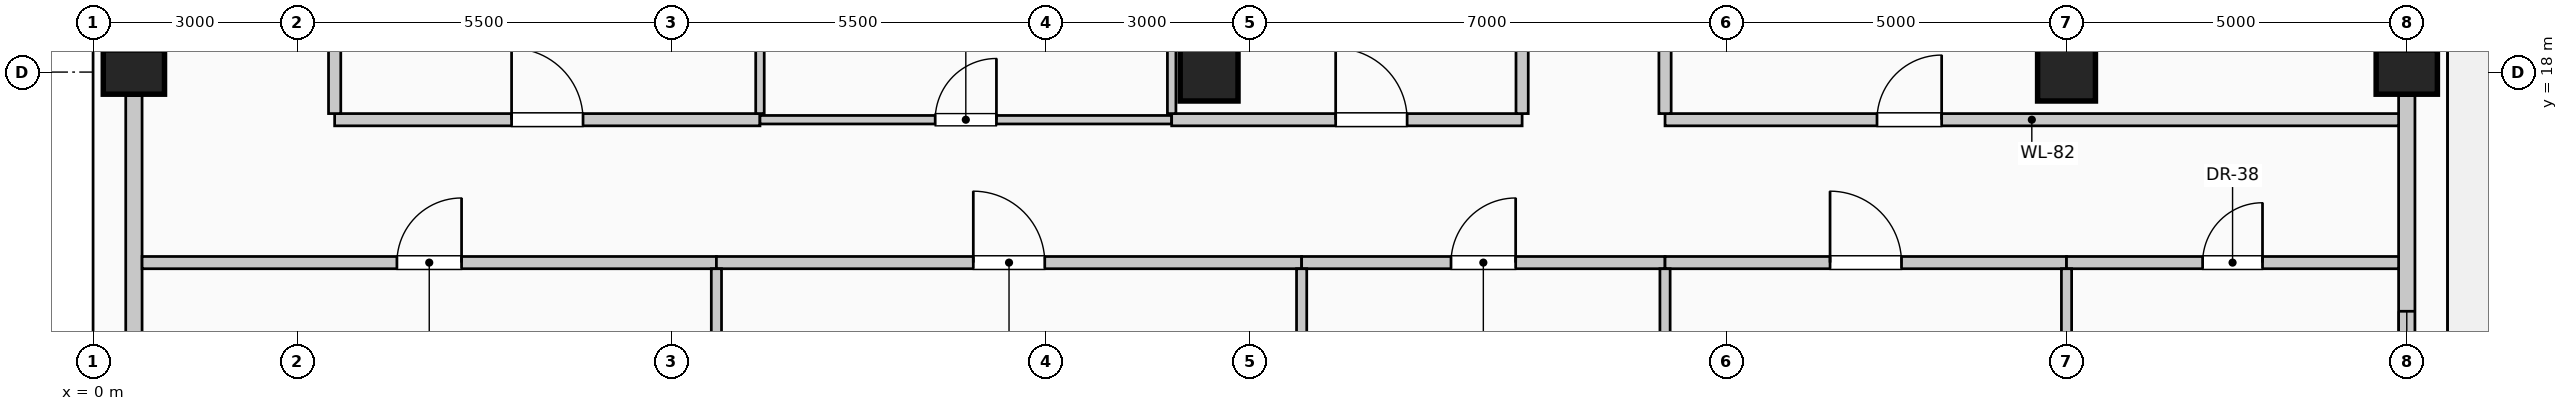
"""IFC4 building model, lengths in metres.
Left out: names, types, materials, properties, quantities, classifications, styles, units other than length and angle.
Written with IfcOpenShell. Run it as: python <this file> out.ifc"""

import sys

from ifc_helpers import new_model, si_unit, direction, frame, frame_2d, origin, origin_2d, place, context, subcontext, project, spatial, rectangle, circle, extrude, element, fill, save


model = new_model("IFC4")
c1 = context("Model", 3, precision=1e-05, world=origin(), true_north=direction((0.0, 1.0)))
c2 = subcontext(c1, "Body", "Model", "MODEL_VIEW")
j1 = project(units=[si_unit("LENGTHUNIT", "METRE"), si_unit("PLANEANGLEUNIT", "RADIAN")], contexts=[c1])
p1 = place(None, origin())
s1 = spatial("IfcSite", under=j1, at=p1, CompositionType="ELEMENT")
p2 = place(p1, origin())
s2 = spatial("IfcBuilding", under=s1, at=p2, CompositionType="ELEMENT")
p3 = place(p2, frame((0.0, 0.0, 305.0)))
s3 = spatial("IfcBuildingStorey", under=s2, at=p3, CompositionType="ELEMENT", Elevation=305.0)
for number, where, z_axis, x_axis in (
    (1, (0.6, 18.0, 0.0), (0.0, 0.0, 1.0), (0.0, 1.0, 0.0)),
    (2, (34.0, 18.0, 0.0), (0.0, 0.0, 1.0), (0.0, 1.0, 0.0)),
):
    element("IfcColumn", number, at=place(p3, frame(where, z_axis=z_axis, x_axis=x_axis)), inside=s3, PredefinedType="COLUMN", context=c2, shape_type="SweptSolid", body=[
        extrude(rectangle(XDim=0.65, YDim=0.9, at=origin_2d()), origin(), (0.0, 0.0, 1.0), 4.0),
    ])
for number, where, z_axis, x_axis in (
    (3, (16.4, 18.0, 0.0), (0.0, 0.0, 1.0), (1.0, 0.0, 0.0)),
    (4, (29.0, 18.0, 0.0), (0.0, 0.0, 1.0), (1.0, 0.0, 0.0)),
):
    element("IfcColumn", number, at=place(p3, frame(where, z_axis=z_axis, x_axis=x_axis)), inside=s3, PredefinedType="COLUMN", context=c2, shape_type="SweptSolid", body=[
        extrude(circle(Radius=0.425, at=origin_2d()), origin(), (0.0, 0.0, 1.0), 4.0),
    ])
p4 = place(p3, frame((0.6, 10.345, 0.0), z_axis=(0.0, 0.0, 1.0), x_axis=(0.0, 1.0, 0.0)))
e5 = element("IfcWall", 5, at=p4, inside=s3, PredefinedType="SOLIDWALL", context=c2, shape_type="SweptSolid", body=[
    extrude(rectangle(XDim=7.31, YDim=0.24, at=frame_2d((3.655, 0.0))), origin(), (0.0, 0.0, 1.0), 3.025),
])
p5 = place(p4, frame((1.037, 0.0, 0.35)))
e6 = element("IfcOpeningElement", 6, at=p5, cuts=e5, PredefinedType="OPENING", context=c2, shape_type="SweptSolid", body=[
    extrude(rectangle(XDim=2.1, YDim=2.2, at=frame_2d((1.05, 1.1))), frame((0.0, 0.13, 0.0), z_axis=(0.0, -1.0, 0.0), x_axis=(1.0, 0.0, 0.0)), (0.0, 0.0, 1.0), 0.26),
])
p6 = place(p3, frame((34.0, 17.655, 0.0), z_axis=(0.0, 0.0, 1.0), x_axis=(0.0, -1.0, 0.0)))
e7 = element("IfcWall", 7, at=p6, inside=s3, PredefinedType="SOLIDWALL", context=c2, shape_type="SweptSolid", body=[
    extrude(rectangle(XDim=13.71, YDim=0.24, at=frame_2d((6.855, 0.0))), origin(), (0.0, 0.0, 1.0), 3.025),
])
p7 = place(p6, frame((3.17, 0.0, 0.35)))
e8 = element("IfcOpeningElement", 8, at=p7, cuts=e7, PredefinedType="OPENING", context=c2, shape_type="SweptSolid", body=[
    extrude(rectangle(XDim=2.1, YDim=2.2, at=frame_2d((1.05, 1.1))), frame((0.0, 0.13, 0.0), z_axis=(0.0, -1.0, 0.0), x_axis=(1.0, 0.0, 0.0)), (0.0, 0.0, 1.0), 0.26),
])
p8 = place(p6, frame((8.44, 0.0, 0.35)))
e9 = element("IfcOpeningElement", 9, at=p8, cuts=e7, PredefinedType="OPENING", context=c2, shape_type="SweptSolid", body=[
    extrude(rectangle(XDim=2.1, YDim=2.2, at=frame_2d((1.05, 1.1))), frame((0.0, 0.13, 0.0), z_axis=(0.0, -1.0, 0.0), x_axis=(1.0, 0.0, 0.0)), (0.0, 0.0, 1.0), 0.26),
])
p9 = place(p3, frame((0.72, 15.2, 0.0), z_axis=(0.0, 0.0, 1.0), x_axis=(1.0, 0.0, 0.0)))
e10 = element("IfcWall", 10, at=p9, inside=s3, PredefinedType="PARTITIONING", context=c2, shape_type="SweptSolid", body=[
    extrude(rectangle(XDim=8.44, YDim=0.18, at=frame_2d((4.22, 0.0))), origin(), (0.0, 0.0, 1.0), 3.775),
])
p10 = place(p9, frame((3.745, 0.0, 0.0)))
e11 = element("IfcOpeningElement", 11, at=p10, cuts=e10, PredefinedType="OPENING", context=c2, shape_type="SweptSolid", body=[
    extrude(rectangle(XDim=0.95, YDim=2.15, at=frame_2d((0.475, 1.075))), frame((0.0, 0.1, 0.0), z_axis=(0.0, -1.0, 0.0), x_axis=(1.0, 0.0, 0.0)), (0.0, 0.0, 1.0), 0.2),
])
p11 = place(p3, frame((9.16, 15.2, 0.0), z_axis=(0.0, 0.0, 1.0), x_axis=(1.0, 0.0, 0.0)))
e12 = element("IfcWall", 12, at=p11, inside=s3, PredefinedType="PARTITIONING", context=c2, shape_type="SweptSolid", body=[
    extrude(rectangle(XDim=8.6, YDim=0.18, at=frame_2d((4.3, 0.0))), origin(), (0.0, 0.0, 1.0), 3.775),
])
p12 = place(p11, frame((3.775, 0.0, 0.0)))
e13 = element("IfcOpeningElement", 13, at=p12, cuts=e12, PredefinedType="OPENING", context=c2, shape_type="SweptSolid", body=[
    extrude(rectangle(XDim=1.05, YDim=2.15, at=frame_2d((0.525, 1.075))), frame((0.0, 0.1, 0.0), z_axis=(0.0, -1.0, 0.0), x_axis=(1.0, 0.0, 0.0)), (0.0, 0.0, 1.0), 0.2),
])
p13 = place(p3, frame((17.76, 15.2, 0.0), z_axis=(0.0, 0.0, 1.0), x_axis=(1.0, 0.0, 0.0)))
e14 = element("IfcWall", 14, at=p13, inside=s3, PredefinedType="PARTITIONING", context=c2, shape_type="SweptSolid", body=[
    extrude(rectangle(XDim=5.34, YDim=0.18, at=frame_2d((2.67, 0.0))), origin(), (0.0, 0.0, 1.0), 3.775),
])
p14 = place(p13, frame((2.195, 0.0, 0.0)))
e15 = element("IfcOpeningElement", 15, at=p14, cuts=e14, PredefinedType="OPENING", context=c2, shape_type="SweptSolid", body=[
    extrude(rectangle(XDim=0.95, YDim=2.15, at=frame_2d((0.475, 1.075))), frame((0.0, 0.1, 0.0), z_axis=(0.0, -1.0, 0.0), x_axis=(1.0, 0.0, 0.0)), (0.0, 0.0, 1.0), 0.2),
])
p15 = place(p3, frame((23.1, 15.2, 0.0), z_axis=(0.0, 0.0, 1.0), x_axis=(1.0, 0.0, 0.0)))
e16 = element("IfcWall", 16, at=p15, inside=s3, PredefinedType="PARTITIONING", context=c2, shape_type="SweptSolid", body=[
    extrude(rectangle(XDim=5.9, YDim=0.18, at=frame_2d((2.95, 0.0))), origin(), (0.0, 0.0, 1.0), 3.775),
])
p16 = place(p15, frame((2.425, 0.0, 0.0)))
e17 = element("IfcOpeningElement", 17, at=p16, cuts=e16, PredefinedType="OPENING", context=c2, shape_type="SweptSolid", body=[
    extrude(rectangle(XDim=1.05, YDim=2.15, at=frame_2d((0.525, 1.075))), frame((0.0, 0.1, 0.0), z_axis=(0.0, -1.0, 0.0), x_axis=(1.0, 0.0, 0.0)), (0.0, 0.0, 1.0), 0.2),
])
p17 = place(p3, frame((29.0, 15.2, 0.0), z_axis=(0.0, 0.0, 1.0), x_axis=(1.0, 0.0, 0.0)))
e18 = element("IfcWall", 18, at=p17, inside=s3, PredefinedType="PARTITIONING", context=c2, shape_type="SweptSolid", body=[
    extrude(rectangle(XDim=4.88, YDim=0.18, at=frame_2d((2.44, 0.0))), origin(), (0.0, 0.0, 1.0), 3.775),
])
p18 = place(p17, frame((2.0, 0.0, 0.0)))
e19 = element("IfcOpeningElement", 19, at=p18, cuts=e18, PredefinedType="OPENING", context=c2, shape_type="SweptSolid", body=[
    extrude(rectangle(XDim=0.88, YDim=2.1, at=frame_2d((0.44, 1.05))), frame((0.0, 0.1, 0.0), z_axis=(0.0, -1.0, 0.0), x_axis=(1.0, 0.0, 0.0)), (0.0, 0.0, 1.0), 0.2),
])
p19 = place(p3, frame((3.55, 17.3, 0.0), z_axis=(0.0, 0.0, 1.0), x_axis=(1.0, 0.0, 0.0)))
e20 = element("IfcWall", 20, at=p19, inside=s3, PredefinedType="PARTITIONING", context=c2, shape_type="SweptSolid", body=[
    extrude(rectangle(XDim=6.25, YDim=0.18, at=frame_2d((3.125, 0.0))), origin(), (0.0, 0.0, 1.0), 3.775),
])
p20 = place(p19, frame((2.6, 0.0, 0.0)))
e21 = element("IfcOpeningElement", 21, at=p20, cuts=e20, PredefinedType="OPENING", context=c2, shape_type="SweptSolid", body=[
    extrude(rectangle(XDim=1.05, YDim=2.15, at=frame_2d((0.525, 1.075))), frame((0.0, 0.1, 0.0), z_axis=(0.0, -1.0, 0.0), x_axis=(1.0, 0.0, 0.0)), (0.0, 0.0, 1.0), 0.2),
])
p21 = place(p3, frame((9.8, 17.3, 0.0), z_axis=(0.0, 0.0, 1.0), x_axis=(1.0, 0.0, 0.0)))
e22 = element("IfcWall", 22, at=p21, inside=s3, PredefinedType="PARTITIONING", context=c2, shape_type="SweptSolid", body=[
    extrude(rectangle(XDim=6.05, YDim=0.125, at=frame_2d((3.025, 0.0))), origin(), (0.0, 0.0, 1.0), 3.775),
])
p22 = place(p21, frame((2.575, 0.0, 0.0)))
e23 = element("IfcOpeningElement", 23, at=p22, cuts=e22, PredefinedType="OPENING", context=c2, shape_type="SweptSolid", body=[
    extrude(rectangle(XDim=0.9, YDim=2.1, at=frame_2d((0.45, 1.05))), frame((0.0, 0.073, 0.0), z_axis=(0.0, -1.0, 0.0), x_axis=(1.0, 0.0, 0.0)), (0.0, 0.0, 1.0), 0.145),
])
p23 = place(p3, frame((15.85, 17.3, 0.0), z_axis=(0.0, 0.0, 1.0), x_axis=(1.0, 0.0, 0.0)))
e24 = element("IfcWall", 24, at=p23, inside=s3, PredefinedType="PARTITIONING", context=c2, shape_type="SweptSolid", body=[
    extrude(rectangle(XDim=5.15, YDim=0.18, at=frame_2d((2.575, 0.0))), origin(), (0.0, 0.0, 1.0), 3.775),
])
p24 = place(p23, frame((2.41, 0.0, 0.0)))
e25 = element("IfcOpeningElement", 25, at=p24, cuts=e24, PredefinedType="OPENING", context=c2, shape_type="SweptSolid", body=[
    extrude(rectangle(XDim=1.05, YDim=2.15, at=frame_2d((0.525, 1.075))), frame((0.0, 0.1, 0.0), z_axis=(0.0, -1.0, 0.0), x_axis=(1.0, 0.0, 0.0)), (0.0, 0.0, 1.0), 0.2),
])
p25 = place(p3, frame((23.1, 17.3, 0.0), z_axis=(0.0, 0.0, 1.0), x_axis=(1.0, 0.0, 0.0)))
e26 = element("IfcWall", 26, at=p25, inside=s3, PredefinedType="PARTITIONING", context=c2, shape_type="SweptSolid", body=[
    extrude(rectangle(XDim=10.78, YDim=0.18, at=frame_2d((5.39, 0.0))), origin(), (0.0, 0.0, 1.0), 3.775),
])
p26 = place(p25, frame((3.115, 0.0, 0.0)))
e27 = element("IfcOpeningElement", 27, at=p26, cuts=e26, PredefinedType="OPENING", context=c2, shape_type="SweptSolid", body=[
    extrude(rectangle(XDim=0.95, YDim=2.15, at=frame_2d((0.475, 1.075))), frame((0.0, 0.1, 0.0), z_axis=(0.0, -1.0, 0.0), x_axis=(1.0, 0.0, 0.0)), (0.0, 0.0, 1.0), 0.2),
])
p27 = place(p3, frame((3.55, 17.39, 0.0), z_axis=(0.0, 0.0, 1.0), x_axis=(0.0, 1.0, 0.0)))
e28 = element("IfcWall", 28, at=p27, inside=s3, PredefinedType="PARTITIONING", context=c2, shape_type="SweptSolid", body=[
    extrude(rectangle(XDim=7.335, YDim=0.18, at=frame_2d((3.667, 0.0))), origin(), (0.0, 0.0, 1.0), 3.775),
])
p28 = place(p3, frame((9.16, 0.72, 0.0), z_axis=(0.0, 0.0, 1.0), x_axis=(0.0, 1.0, 0.0)))
e29 = element("IfcWall", 29, at=p28, inside=s3, PredefinedType="PARTITIONING", context=c2, shape_type="SweptSolid", body=[
    extrude(rectangle(XDim=14.39, YDim=0.15, at=frame_2d((7.195, 0.0))), origin(), (0.0, 0.0, 1.0), 3.775),
])
for number, where, z_axis, x_axis in (
    (30, (9.8, 17.39, 0.0), (0.0, 0.0, 1.0), (0.0, 1.0, 0.0)),
    (31, (15.85, 17.39, 0.0), (0.0, 0.0, 1.0), (0.0, 1.0, 0.0)),
):
    element("IfcWall", number, at=place(p3, frame(where, z_axis=z_axis, x_axis=x_axis)), inside=s3, PredefinedType="PARTITIONING", context=c2, shape_type="SweptSolid", body=[
        extrude(rectangle(XDim=7.335, YDim=0.125, at=frame_2d((3.667, 0.0))), origin(), (0.0, 0.0, 1.0), 3.775),
    ])
p29 = place(p3, frame((17.76, 0.4, 0.0), z_axis=(0.0, 0.0, 1.0), x_axis=(0.0, 1.0, 0.0)))
e32 = element("IfcWall", 32, at=p29, inside=s3, PredefinedType="PARTITIONING", context=c2, shape_type="SweptSolid", body=[
    extrude(rectangle(XDim=14.71, YDim=0.15, at=frame_2d((7.355, 0.0))), origin(), (0.0, 0.0, 1.0), 3.775),
])
p30 = place(p3, frame((21.0, 17.39, 0.0), z_axis=(0.0, 0.0, 1.0), x_axis=(0.0, 1.0, 0.0)))
e33 = element("IfcWall", 33, at=p30, inside=s3, PredefinedType="PARTITIONING", context=c2, shape_type="SweptSolid", body=[
    extrude(rectangle(XDim=7.335, YDim=0.18, at=frame_2d((3.667, 0.0))), origin(), (0.0, 0.0, 1.0), 3.775),
])
p31 = place(p3, frame((23.1, 0.4, 0.0), z_axis=(0.0, 0.0, 1.0), x_axis=(0.0, 1.0, 0.0)))
e34 = element("IfcWall", 34, at=p31, inside=s3, PredefinedType="PARTITIONING", context=c2, shape_type="SweptSolid", body=[
    extrude(rectangle(XDim=14.71, YDim=0.15, at=frame_2d((7.355, 0.0))), origin(), (0.0, 0.0, 1.0), 3.775),
])
p32 = place(p3, frame((23.1, 17.39, 0.0), z_axis=(0.0, 0.0, 1.0), x_axis=(0.0, 1.0, 0.0)))
e35 = element("IfcWall", 35, at=p32, inside=s3, PredefinedType="PARTITIONING", context=c2, shape_type="SweptSolid", body=[
    extrude(rectangle(XDim=8.835, YDim=0.18, at=frame_2d((4.417, 0.0))), origin(), (0.0, 0.0, 1.0), 3.775),
])
p33 = place(p3, frame((29.0, 1.05, 0.0), z_axis=(0.0, 0.0, 1.0), x_axis=(0.0, 1.0, 0.0)))
e36 = element("IfcWall", 36, at=p33, inside=s3, PredefinedType="PARTITIONING", context=c2, shape_type="SweptSolid", body=[
    extrude(rectangle(XDim=14.06, YDim=0.15, at=frame_2d((7.03, 0.0))), origin(), (0.0, 0.0, 1.0), 3.27),
])
p34 = place(p7, origin())
e37 = element("IfcWindow", 37, at=p34, inside=s3, PartitioningType="SINGLE_PANEL", PredefinedType="WINDOW", context=c2, shape_type="SweptSolid", body=[
    extrude(rectangle(XDim=2.1, YDim=2.2, at=frame_2d((1.05, 1.1))), frame((0.0, 0.03, 0.0), z_axis=(0.0, -1.0, 0.0), x_axis=(1.0, 0.0, 0.0)), (0.0, 0.0, 1.0), 0.06),
])
fill(e8, e37)
p35 = place(p10, origin())
e38 = element("IfcDoor", 38, at=p35, inside=s3, OperationType="SINGLE_SWING_RIGHT", PredefinedType="DOOR", context=c2, shape_type="SweptSolid", body=[
    extrude(rectangle(XDim=0.95, YDim=2.15, at=frame_2d((0.475, 1.075))), frame((0.0, 0.025, 0.0), z_axis=(0.0, -1.0, 0.0), x_axis=(1.0, 0.0, 0.0)), (0.0, 0.0, 1.0), 0.05),
])
fill(e11, e38)
p36 = place(p12, origin())
e39 = element("IfcDoor", 39, at=p36, inside=s3, OperationType="SINGLE_SWING_LEFT", PredefinedType="DOOR", context=c2, shape_type="SweptSolid", body=[
    extrude(rectangle(XDim=1.05, YDim=2.15, at=frame_2d((0.525, 1.075))), frame((0.0, 0.025, 0.0), z_axis=(0.0, -1.0, 0.0), x_axis=(1.0, 0.0, 0.0)), (0.0, 0.0, 1.0), 0.05),
])
fill(e13, e39)
p37 = place(p14, origin())
e40 = element("IfcDoor", 40, at=p37, inside=s3, OperationType="SINGLE_SWING_RIGHT", PredefinedType="DOOR", context=c2, shape_type="SweptSolid", body=[
    extrude(rectangle(XDim=0.95, YDim=2.15, at=frame_2d((0.475, 1.075))), frame((0.0, 0.025, 0.0), z_axis=(0.0, -1.0, 0.0), x_axis=(1.0, 0.0, 0.0)), (0.0, 0.0, 1.0), 0.05),
])
fill(e15, e40)
p38 = place(p16, origin())
e41 = element("IfcDoor", 41, at=p38, inside=s3, OperationType="SINGLE_SWING_LEFT", PredefinedType="DOOR", context=c2, shape_type="SweptSolid", body=[
    extrude(rectangle(XDim=1.05, YDim=2.15, at=frame_2d((0.525, 1.075))), frame((0.0, 0.025, 0.0), z_axis=(0.0, -1.0, 0.0), x_axis=(1.0, 0.0, 0.0)), (0.0, 0.0, 1.0), 0.05),
])
fill(e17, e41)
p39 = place(p18, origin())
e42 = element("IfcDoor", 42, at=p39, inside=s3, OperationType="SINGLE_SWING_RIGHT", PredefinedType="DOOR", context=c2, shape_type="SweptSolid", body=[
    extrude(rectangle(XDim=0.88, YDim=2.1, at=frame_2d((0.44, 1.05))), frame((0.0, 0.025, 0.0), z_axis=(0.0, -1.0, 0.0), x_axis=(1.0, 0.0, 0.0)), (0.0, 0.0, 1.0), 0.05),
])
fill(e19, e42)
p40 = place(p20, origin())
e43 = element("IfcDoor", 43, at=p40, inside=s3, OperationType="SINGLE_SWING_LEFT", PredefinedType="DOOR", context=c2, shape_type="SweptSolid", body=[
    extrude(rectangle(XDim=1.05, YDim=2.15, at=frame_2d((0.525, 1.075))), frame((0.0, 0.025, 0.0), z_axis=(0.0, -1.0, 0.0), x_axis=(1.0, 0.0, 0.0)), (0.0, 0.0, 1.0), 0.05),
])
fill(e21, e43)
p41 = place(p22, origin())
e44 = element("IfcDoor", 44, at=p41, inside=s3, OperationType="SINGLE_SWING_RIGHT", PredefinedType="DOOR", context=c2, shape_type="SweptSolid", body=[
    extrude(rectangle(XDim=0.9, YDim=2.1, at=frame_2d((0.45, 1.05))), frame((0.0, 0.025, 0.0), z_axis=(0.0, -1.0, 0.0), x_axis=(1.0, 0.0, 0.0)), (0.0, 0.0, 1.0), 0.05),
])
fill(e23, e44)
p42 = place(p24, origin())
e45 = element("IfcDoor", 45, at=p42, inside=s3, OperationType="SINGLE_SWING_LEFT", PredefinedType="DOOR", context=c2, shape_type="SweptSolid", body=[
    extrude(rectangle(XDim=1.05, YDim=2.15, at=frame_2d((0.525, 1.075))), frame((0.0, 0.025, 0.0), z_axis=(0.0, -1.0, 0.0), x_axis=(1.0, 0.0, 0.0)), (0.0, 0.0, 1.0), 0.05),
])
fill(e25, e45)
p43 = place(p26, origin())
e46 = element("IfcDoor", 46, at=p43, inside=s3, OperationType="SINGLE_SWING_RIGHT", PredefinedType="DOOR", context=c2, shape_type="SweptSolid", body=[
    extrude(rectangle(XDim=0.95, YDim=2.15, at=frame_2d((0.475, 1.075))), frame((0.0, 0.025, 0.0), z_axis=(0.0, -1.0, 0.0), x_axis=(1.0, 0.0, 0.0)), (0.0, 0.0, 1.0), 0.05),
])
fill(e27, e46)
save(model, sys.argv[1])
